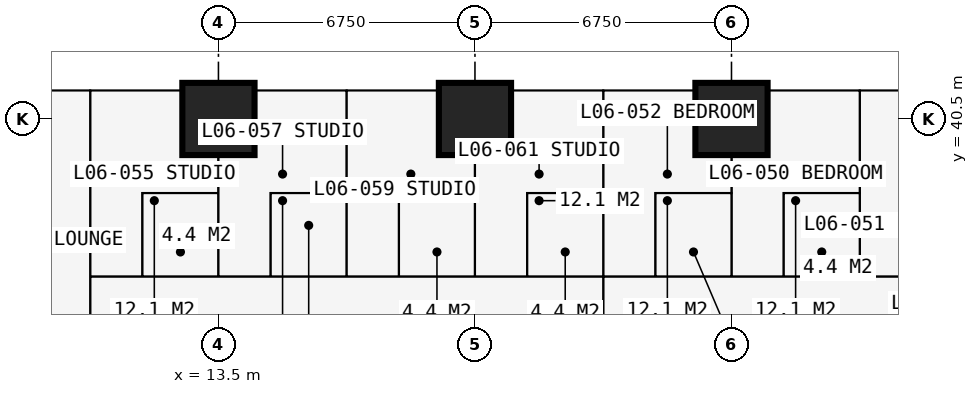
"""IFC4 building model, lengths in metres.
Left out: names, types, materials, properties, quantities, classifications, styles, units other than length and angle.
Written with IfcOpenShell. Run it as: python <this file> out.ifc"""

import sys

from ifc_helpers import new_model, si_unit, direction, frame, frame_2d, origin, origin_2d, place, context, subcontext, project, spatial, rectangle, extrude, element, fill, save


model = new_model("IFC4")
c1 = context("Model", 3, precision=1e-05, world=origin(), true_north=direction((0.0, 1.0)))
c2 = subcontext(c1, "Body", "Model", "MODEL_VIEW")
j1 = project(units=[si_unit("LENGTHUNIT", "METRE"), si_unit("PLANEANGLEUNIT", "RADIAN")], contexts=[c1])
p1 = place(None, origin())
s1 = spatial("IfcSite", under=j1, at=p1, CompositionType="ELEMENT")
p2 = place(p1, origin())
s2 = spatial("IfcBuilding", under=s1, at=p2, CompositionType="ELEMENT")
p3 = place(p2, frame((0.0, 0.0, 25.2)))
s3 = spatial("IfcBuildingStorey", under=s2, at=p3, CompositionType="ELEMENT", Elevation=25.2)
for number, where, z_axis, x_axis in (
    (1, (13.5, 40.5, 0.0), (0.0, 0.0, 1.0), (1.0, 0.0, 0.0)),
    (2, (20.25, 40.5, 0.0), (0.0, 0.0, 1.0), (1.0, 0.0, 0.0)),
    (3, (27.0, 40.5, 0.0), (0.0, 0.0, 1.0), (1.0, 0.0, 0.0)),
):
    element("IfcColumn", number, at=place(p3, frame(where, z_axis=z_axis, x_axis=x_axis)), inside=s3, PredefinedType="COLUMN", context=c2, shape_type="SweptSolid", body=[
        extrude(rectangle(XDim=1.9, YDim=1.9, at=origin_2d()), origin(), (0.0, 0.0, 1.0), 3.6),
    ])
p4 = place(p3, frame((13.5, 41.25, 0.0), z_axis=(0.0, 0.0, 1.0), x_axis=(1.0, 0.0, 0.0)))
e4 = element("IfcWall", 4, at=p4, inside=s3, PredefinedType="SOLIDWALL", context=c2, shape_type="SweptSolid", body=[
    extrude(rectangle(XDim=6.75, YDim=0.15, at=frame_2d((3.375, 0.0))), origin(), (0.0, 0.0, 1.0), 3.375),
])
p5 = place(p4, frame((0.996, 0.0, 0.0)))
e5 = element("IfcOpeningElement", 5, at=p5, cuts=e4, PredefinedType="OPENING", context=c2, shape_type="SweptSolid", body=[
    extrude(rectangle(XDim=1.0, YDim=2.2, at=frame_2d((0.5, 1.1))), frame((0.0, 0.085, 0.0), z_axis=(0.0, -1.0, 0.0), x_axis=(1.0, 0.0, 0.0)), (0.0, 0.0, 1.0), 0.17),
])
p6 = place(p4, frame((2.042, 0.0, 0.9)))
e6 = element("IfcOpeningElement", 6, at=p6, cuts=e4, PredefinedType="OPENING", context=c2, shape_type="SweptSolid", body=[
    extrude(rectangle(XDim=1.2, YDim=1.8, at=frame_2d((0.6, 0.9))), frame((0.0, 0.085, 0.0), z_axis=(0.0, -1.0, 0.0), x_axis=(1.0, 0.0, 0.0)), (0.0, 0.0, 1.0), 0.17),
])
p7 = place(p4, frame((4.754, 0.0, 0.0)))
e7 = element("IfcOpeningElement", 7, at=p7, cuts=e4, PredefinedType="OPENING", context=c2, shape_type="SweptSolid", body=[
    extrude(rectangle(XDim=1.0, YDim=2.2, at=frame_2d((0.5, 1.1))), frame((0.0, 0.085, 0.0), z_axis=(0.0, -1.0, 0.0), x_axis=(1.0, 0.0, 0.0)), (0.0, 0.0, 1.0), 0.17),
])
p8 = place(p4, frame((3.508, 0.0, 0.9)))
e8 = element("IfcOpeningElement", 8, at=p8, cuts=e4, PredefinedType="OPENING", context=c2, shape_type="SweptSolid", body=[
    extrude(rectangle(XDim=1.2, YDim=1.8, at=frame_2d((0.6, 0.9))), frame((0.0, 0.085, 0.0), z_axis=(0.0, -1.0, 0.0), x_axis=(1.0, 0.0, 0.0)), (0.0, 0.0, 1.0), 0.17),
])
p9 = place(p3, frame((16.875, 41.35, 0.0), z_axis=(0.0, 0.0, 1.0), x_axis=(0.0, 1.0, 0.0)))
e9 = element("IfcWall", 9, at=p9, inside=s3, PredefinedType="USERDEFINED", context=c2, shape_type="SweptSolid", body=[
    extrude(rectangle(XDim=2.2, YDim=1.0, at=frame_2d((1.1, 0.0))), origin(), (0.0, 0.0, 1.0), 0.9),
])
p10 = place(p3, frame((10.125, 30.375, 0.0), z_axis=(0.0, 0.0, 1.0), x_axis=(0.0, 1.0, 0.0)))
e10 = element("IfcWall", 10, at=p10, inside=s3, PredefinedType="PARTITIONING", context=c2, shape_type="SweptSolid", body=[
    extrude(rectangle(XDim=10.859, YDim=0.15, at=frame_2d((5.429, 0.0))), origin(), (0.0, 0.0, 1.0), 3.375),
])
p11 = place(p10, frame((4.725, 0.0, 0.0)))
e11 = element("IfcOpeningElement", 11, at=p11, cuts=e10, PredefinedType="OPENING", context=c2, shape_type="SweptSolid", body=[
    extrude(rectangle(XDim=1.0, YDim=2.2, at=frame_2d((0.5, 1.1))), frame((0.0, 0.085, 0.0), z_axis=(0.0, -1.0, 0.0), x_axis=(1.0, 0.0, 0.0)), (0.0, 0.0, 1.0), 0.17),
])
p12 = place(p3, frame((10.125, 36.35, 0.0), z_axis=(0.0, 0.0, 1.0), x_axis=(1.0, 0.0, 0.0)))
e12 = element("IfcWall", 12, at=p12, inside=s3, PredefinedType="PARTITIONING", context=c2, shape_type="SweptSolid", body=[
    extrude(rectangle(XDim=23.625, YDim=0.1, at=frame_2d((11.812, 0.0))), origin(), (0.0, 0.0, 1.0), 3.375),
])
p13 = place(p12, frame((21.45, 0.0, 0.0)))
e13 = element("IfcOpeningElement", 13, at=p13, cuts=e12, PredefinedType="OPENING", context=c2, shape_type="SweptSolid", body=[
    extrude(rectangle(XDim=1.0, YDim=2.2, at=frame_2d((0.5, 1.1))), frame((0.0, 0.06, 0.0), z_axis=(0.0, -1.0, 0.0), x_axis=(1.0, 0.0, 0.0)), (0.0, 0.0, 1.0), 0.12),
])
p14 = place(p12, frame((17.125, 0.0, 0.0)))
e14 = element("IfcOpeningElement", 14, at=p14, cuts=e12, PredefinedType="OPENING", context=c2, shape_type="SweptSolid", body=[
    extrude(rectangle(XDim=0.95, YDim=2.2, at=frame_2d((0.475, 1.1))), frame((0.0, 0.06, 0.0), z_axis=(0.0, -1.0, 0.0), x_axis=(1.0, 0.0, 0.0)), (0.0, 0.0, 1.0), 0.12),
])
p15 = place(p12, frame((13.7, 0.0, 0.0)))
e15 = element("IfcOpeningElement", 15, at=p15, cuts=e12, PredefinedType="OPENING", context=c2, shape_type="SweptSolid", body=[
    extrude(rectangle(XDim=0.95, YDim=2.2, at=frame_2d((0.475, 1.1))), frame((0.0, 0.06, 0.0), z_axis=(0.0, -1.0, 0.0), x_axis=(1.0, 0.0, 0.0)), (0.0, 0.0, 1.0), 0.12),
])
p16 = place(p12, frame((0.2, 0.0, 0.0)))
e16 = element("IfcOpeningElement", 16, at=p16, cuts=e12, PredefinedType="OPENING", context=c2, shape_type="SweptSolid", body=[
    extrude(rectangle(XDim=0.95, YDim=2.2, at=frame_2d((0.475, 1.1))), frame((0.0, 0.06, 0.0), z_axis=(0.0, -1.0, 0.0), x_axis=(1.0, 0.0, 0.0)), (0.0, 0.0, 1.0), 0.12),
])
p17 = place(p12, frame((3.625, 0.0, 0.0)))
e17 = element("IfcOpeningElement", 17, at=p17, cuts=e12, PredefinedType="OPENING", context=c2, shape_type="SweptSolid", body=[
    extrude(rectangle(XDim=0.95, YDim=2.2, at=frame_2d((0.475, 1.1))), frame((0.0, 0.06, 0.0), z_axis=(0.0, -1.0, 0.0), x_axis=(1.0, 0.0, 0.0)), (0.0, 0.0, 1.0), 0.12),
])
p18 = place(p12, frame((7.0, 0.0, 0.0)))
e18 = element("IfcOpeningElement", 18, at=p18, cuts=e12, PredefinedType="OPENING", context=c2, shape_type="SweptSolid", body=[
    extrude(rectangle(XDim=0.95, YDim=2.2, at=frame_2d((0.475, 1.1))), frame((0.0, 0.06, 0.0), z_axis=(0.0, -1.0, 0.0), x_axis=(1.0, 0.0, 0.0)), (0.0, 0.0, 1.0), 0.12),
])
p19 = place(p12, frame((10.375, 0.0, 0.0)))
e19 = element("IfcOpeningElement", 19, at=p19, cuts=e12, PredefinedType="OPENING", context=c2, shape_type="SweptSolid", body=[
    extrude(rectangle(XDim=0.95, YDim=2.2, at=frame_2d((0.475, 1.1))), frame((0.0, 0.06, 0.0), z_axis=(0.0, -1.0, 0.0), x_axis=(1.0, 0.0, 0.0)), (0.0, 0.0, 1.0), 0.12),
])
p20 = place(p3, frame((11.5, 36.35, 0.0), z_axis=(0.0, 0.0, 1.0), x_axis=(0.0, 1.0, 0.0)))
e20 = element("IfcWall", 20, at=p20, inside=s3, PredefinedType="PARTITIONING", context=c2, shape_type="SweptSolid", body=[
    extrude(rectangle(XDim=2.2, YDim=0.1, at=frame_2d((1.1, 0.0))), origin(), (0.0, 0.0, 1.0), 3.375),
])
p21 = place(p20, frame((0.65, 0.0, 0.0)))
e21 = element("IfcOpeningElement", 21, at=p21, cuts=e20, PredefinedType="OPENING", context=c2, shape_type="SweptSolid", body=[
    extrude(rectangle(XDim=0.9, YDim=2.2, at=frame_2d((0.45, 1.1))), frame((0.0, 0.06, 0.0), z_axis=(0.0, -1.0, 0.0), x_axis=(1.0, 0.0, 0.0)), (0.0, 0.0, 1.0), 0.12),
])
p22 = place(p3, frame((11.5, 38.55, 0.0), z_axis=(0.0, 0.0, 1.0), x_axis=(1.0, 0.0, 0.0)))
e22 = element("IfcWall", 22, at=p22, inside=s3, PredefinedType="PARTITIONING", context=c2, shape_type="SweptSolid", body=[
    extrude(rectangle(XDim=2.0, YDim=0.1, at=frame_2d((1.0, 0.0))), origin(), (0.0, 0.0, 1.0), 3.375),
])
p23 = place(p3, frame((13.5, 36.35, 0.0), z_axis=(0.0, 0.0, 1.0), x_axis=(0.0, 1.0, 0.0)))
e23 = element("IfcWall", 23, at=p23, inside=s3, PredefinedType="PARTITIONING", context=c2, shape_type="SweptSolid", body=[
    extrude(rectangle(XDim=4.884, YDim=0.175, at=frame_2d((2.442, 0.0))), origin(), (0.0, 0.0, 1.0), 2.877),
])
p24 = place(p3, frame((14.875, 36.35, 0.0), z_axis=(0.0, 0.0, 1.0), x_axis=(0.0, 1.0, 0.0)))
e24 = element("IfcWall", 24, at=p24, inside=s3, PredefinedType="PARTITIONING", context=c2, shape_type="SweptSolid", body=[
    extrude(rectangle(XDim=2.2, YDim=0.1, at=frame_2d((1.1, 0.0))), origin(), (0.0, 0.0, 1.0), 3.375),
])
p25 = place(p24, frame((0.65, 0.0, 0.0)))
e25 = element("IfcOpeningElement", 25, at=p25, cuts=e24, PredefinedType="OPENING", context=c2, shape_type="SweptSolid", body=[
    extrude(rectangle(XDim=0.9, YDim=2.2, at=frame_2d((0.45, 1.1))), frame((0.0, 0.06, 0.0), z_axis=(0.0, -1.0, 0.0), x_axis=(1.0, 0.0, 0.0)), (0.0, 0.0, 1.0), 0.12),
])
p26 = place(p3, frame((14.875, 38.55, 0.0), z_axis=(0.0, 0.0, 1.0), x_axis=(1.0, 0.0, 0.0)))
e26 = element("IfcWall", 26, at=p26, inside=s3, PredefinedType="PARTITIONING", context=c2, shape_type="SweptSolid", body=[
    extrude(rectangle(XDim=2.0, YDim=0.1, at=frame_2d((1.0, 0.0))), origin(), (0.0, 0.0, 1.0), 3.375),
])
p27 = place(p3, frame((16.875, 36.35, 0.0), z_axis=(0.0, 0.0, 1.0), x_axis=(0.0, 1.0, 0.0)))
e27 = element("IfcWall", 27, at=p27, inside=s3, PredefinedType="PARTITIONING", context=c2, shape_type="SweptSolid", body=[
    extrude(rectangle(XDim=4.884, YDim=0.175, at=frame_2d((2.442, 0.0))), origin(), (0.0, 0.0, 1.0), 3.375),
])
p28 = place(p3, frame((18.25, 36.35, 0.0), z_axis=(0.0, 0.0, 1.0), x_axis=(0.0, 1.0, 0.0)))
e28 = element("IfcWall", 28, at=p28, inside=s3, PredefinedType="PARTITIONING", context=c2, shape_type="SweptSolid", body=[
    extrude(rectangle(XDim=2.2, YDim=0.1, at=frame_2d((1.1, 0.0))), origin(), (0.0, 0.0, 1.0), 3.375),
])
p29 = place(p28, frame((0.65, 0.0, 0.0)))
e29 = element("IfcOpeningElement", 29, at=p29, cuts=e28, PredefinedType="OPENING", context=c2, shape_type="SweptSolid", body=[
    extrude(rectangle(XDim=0.9, YDim=2.2, at=frame_2d((0.45, 1.1))), frame((0.0, 0.06, 0.0), z_axis=(0.0, -1.0, 0.0), x_axis=(1.0, 0.0, 0.0)), (0.0, 0.0, 1.0), 0.12),
])
p30 = place(p3, frame((18.25, 38.55, 0.0), z_axis=(0.0, 0.0, 1.0), x_axis=(1.0, 0.0, 0.0)))
e30 = element("IfcWall", 30, at=p30, inside=s3, PredefinedType="PARTITIONING", context=c2, shape_type="SweptSolid", body=[
    extrude(rectangle(XDim=2.0, YDim=0.1, at=frame_2d((1.0, 0.0))), origin(), (0.0, 0.0, 1.0), 3.375),
])
p31 = place(p3, frame((20.25, 36.35, 0.0), z_axis=(0.0, 0.0, 1.0), x_axis=(0.0, 1.0, 0.0)))
e31 = element("IfcWall", 31, at=p31, inside=s3, PredefinedType="PARTITIONING", context=c2, shape_type="SweptSolid", body=[
    extrude(rectangle(XDim=4.884, YDim=0.175, at=frame_2d((2.442, 0.0))), origin(), (0.0, 0.0, 1.0), 2.61),
])
p32 = place(p3, frame((21.625, 36.35, 0.0), z_axis=(0.0, 0.0, 1.0), x_axis=(0.0, 1.0, 0.0)))
e32 = element("IfcWall", 32, at=p32, inside=s3, PredefinedType="PARTITIONING", context=c2, shape_type="SweptSolid", body=[
    extrude(rectangle(XDim=2.2, YDim=0.1, at=frame_2d((1.1, 0.0))), origin(), (0.0, 0.0, 1.0), 3.375),
])
p33 = place(p32, frame((0.65, 0.0, 0.0)))
e33 = element("IfcOpeningElement", 33, at=p33, cuts=e32, PredefinedType="OPENING", context=c2, shape_type="SweptSolid", body=[
    extrude(rectangle(XDim=0.9, YDim=2.2, at=frame_2d((0.45, 1.1))), frame((0.0, 0.06, 0.0), z_axis=(0.0, -1.0, 0.0), x_axis=(1.0, 0.0, 0.0)), (0.0, 0.0, 1.0), 0.12),
])
p34 = place(p3, frame((21.625, 38.55, 0.0), z_axis=(0.0, 0.0, 1.0), x_axis=(1.0, 0.0, 0.0)))
e34 = element("IfcWall", 34, at=p34, inside=s3, PredefinedType="PARTITIONING", context=c2, shape_type="SweptSolid", body=[
    extrude(rectangle(XDim=2.0, YDim=0.1, at=frame_2d((1.0, 0.0))), origin(), (0.0, 0.0, 1.0), 3.375),
])
p35 = place(p3, frame((23.625, 29.2, 0.0), z_axis=(0.0, 0.0, 1.0), x_axis=(0.0, 1.0, 0.0)))
e35 = element("IfcWall", 35, at=p35, inside=s3, PredefinedType="PARTITIONING", context=c2, shape_type="SweptSolid", body=[
    extrude(rectangle(XDim=12.034, YDim=0.15, at=frame_2d((6.017, 0.0))), origin(), (0.0, 0.0, 1.0), 3.375),
])
p36 = place(p3, frame((25.0, 36.35, 0.0), z_axis=(0.0, 0.0, 1.0), x_axis=(0.0, 1.0, 0.0)))
e36 = element("IfcWall", 36, at=p36, inside=s3, PredefinedType="PARTITIONING", context=c2, shape_type="SweptSolid", body=[
    extrude(rectangle(XDim=2.2, YDim=0.1, at=frame_2d((1.1, 0.0))), origin(), (0.0, 0.0, 1.0), 3.375),
])
p37 = place(p3, frame((25.0, 38.55, 0.0), z_axis=(0.0, 0.0, 1.0), x_axis=(1.0, 0.0, 0.0)))
e37 = element("IfcWall", 37, at=p37, inside=s3, PredefinedType="PARTITIONING", context=c2, shape_type="SweptSolid", body=[
    extrude(rectangle(XDim=2.0, YDim=0.1, at=frame_2d((1.0, 0.0))), origin(), (0.0, 0.0, 1.0), 3.375),
])
p38 = place(p3, frame((27.0, 36.35, 0.0), z_axis=(0.0, 0.0, 1.0), x_axis=(0.0, 1.0, 0.0)))
e38 = element("IfcWall", 38, at=p38, inside=s3, PredefinedType="PARTITIONING", context=c2, shape_type="SweptSolid", body=[
    extrude(rectangle(XDim=4.884, YDim=0.175, at=frame_2d((2.442, 0.0))), origin(), (0.0, 0.0, 1.0), 2.61),
])
p39 = place(p38, frame((0.65, 0.0, 0.0)))
e39 = element("IfcOpeningElement", 39, at=p39, cuts=e38, PredefinedType="OPENING", context=c2, shape_type="SweptSolid", body=[
    extrude(rectangle(XDim=0.9, YDim=2.2, at=frame_2d((0.45, 1.1))), frame((0.0, 0.097, 0.0), z_axis=(0.0, -1.0, 0.0), x_axis=(1.0, 0.0, 0.0)), (0.0, 0.0, 1.0), 0.195),
])
p40 = place(p3, frame((28.375, 36.35, 0.0), z_axis=(0.0, 0.0, 1.0), x_axis=(0.0, 1.0, 0.0)))
e40 = element("IfcWall", 40, at=p40, inside=s3, PredefinedType="PARTITIONING", context=c2, shape_type="SweptSolid", body=[
    extrude(rectangle(XDim=2.2, YDim=0.1, at=frame_2d((1.1, 0.0))), origin(), (0.0, 0.0, 1.0), 3.375),
])
p41 = place(p40, frame((0.65, 0.0, 0.0)))
e41 = element("IfcOpeningElement", 41, at=p41, cuts=e40, PredefinedType="OPENING", context=c2, shape_type="SweptSolid", body=[
    extrude(rectangle(XDim=0.9, YDim=2.2, at=frame_2d((0.45, 1.1))), frame((0.0, 0.06, 0.0), z_axis=(0.0, -1.0, 0.0), x_axis=(1.0, 0.0, 0.0)), (0.0, 0.0, 1.0), 0.12),
])
p42 = place(p3, frame((28.375, 38.55, 0.0), z_axis=(0.0, 0.0, 1.0), x_axis=(1.0, 0.0, 0.0)))
e42 = element("IfcWall", 42, at=p42, inside=s3, PredefinedType="PARTITIONING", context=c2, shape_type="SweptSolid", body=[
    extrude(rectangle(XDim=2.0, YDim=0.1, at=frame_2d((1.0, 0.0))), origin(), (0.0, 0.0, 1.0), 3.375),
])
p43 = place(p3, frame((30.375, 36.35, 0.0), z_axis=(0.0, 0.0, 1.0), x_axis=(0.0, 1.0, 0.0)))
e43 = element("IfcWall", 43, at=p43, inside=s3, PredefinedType="PARTITIONING", context=c2, shape_type="SweptSolid", body=[
    extrude(rectangle(XDim=4.884, YDim=0.15, at=frame_2d((2.442, 0.0))), origin(), (0.0, 0.0, 1.0), 3.375),
])
p44 = place(p5, origin())
e44 = element("IfcDoor", 44, at=p44, inside=s3, OperationType="SINGLE_SWING_LEFT", PredefinedType="DOOR", context=c2, shape_type="SweptSolid", body=[
    extrude(rectangle(XDim=1.0, YDim=2.2, at=frame_2d((0.5, 1.1))), frame((0.0, 0.025, 0.0), z_axis=(0.0, -1.0, 0.0), x_axis=(1.0, 0.0, 0.0)), (0.0, 0.0, 1.0), 0.05),
])
fill(e5, e44)
p45 = place(p6, origin())
e45 = element("IfcWindow", 45, at=p45, inside=s3, PartitioningType="SINGLE_PANEL", PredefinedType="WINDOW", context=c2, shape_type="SweptSolid", body=[
    extrude(rectangle(XDim=1.2, YDim=1.8, at=frame_2d((0.6, 0.9))), frame((0.0, 0.03, 0.0), z_axis=(0.0, -1.0, 0.0), x_axis=(1.0, 0.0, 0.0)), (0.0, 0.0, 1.0), 0.06),
])
fill(e6, e45)
p46 = place(p7, origin())
e46 = element("IfcDoor", 46, at=p46, inside=s3, OperationType="SINGLE_SWING_RIGHT", PredefinedType="DOOR", context=c2, shape_type="SweptSolid", body=[
    extrude(rectangle(XDim=1.0, YDim=2.2, at=frame_2d((0.5, 1.1))), frame((0.0, 0.025, 0.0), z_axis=(0.0, -1.0, 0.0), x_axis=(1.0, 0.0, 0.0)), (0.0, 0.0, 1.0), 0.05),
])
fill(e7, e46)
p47 = place(p8, origin())
e47 = element("IfcWindow", 47, at=p47, inside=s3, PartitioningType="SINGLE_PANEL", PredefinedType="WINDOW", context=c2, shape_type="SweptSolid", body=[
    extrude(rectangle(XDim=1.2, YDim=1.8, at=frame_2d((0.6, 0.9))), frame((0.0, 0.03, 0.0), z_axis=(0.0, -1.0, 0.0), x_axis=(1.0, 0.0, 0.0)), (0.0, 0.0, 1.0), 0.06),
])
fill(e8, e47)
p48 = place(p14, origin())
e48 = element("IfcDoor", 48, at=p48, inside=s3, OperationType="SINGLE_SWING_LEFT", PredefinedType="DOOR", context=c2, shape_type="SweptSolid", body=[
    extrude(rectangle(XDim=0.95, YDim=2.2, at=frame_2d((0.475, 1.1))), frame((0.0, 0.025, 0.0), z_axis=(0.0, -1.0, 0.0), x_axis=(1.0, 0.0, 0.0)), (0.0, 0.0, 1.0), 0.05),
])
fill(e14, e48)
p49 = place(p41, origin())
e49 = element("IfcDoor", 49, at=p49, inside=s3, OperationType="SINGLE_SWING_RIGHT", PredefinedType="DOOR", context=c2, shape_type="SweptSolid", body=[
    extrude(rectangle(XDim=0.9, YDim=2.2, at=frame_2d((0.45, 1.1))), frame((0.0, 0.025, 0.0), z_axis=(0.0, -1.0, 0.0), x_axis=(1.0, 0.0, 0.0)), (0.0, 0.0, 1.0), 0.05),
])
fill(e41, e49)
p50 = place(p15, origin())
e50 = element("IfcDoor", 50, at=p50, inside=s3, OperationType="SINGLE_SWING_LEFT", PredefinedType="DOOR", context=c2, shape_type="SweptSolid", body=[
    extrude(rectangle(XDim=0.95, YDim=2.2, at=frame_2d((0.475, 1.1))), frame((0.0, 0.025, 0.0), z_axis=(0.0, -1.0, 0.0), x_axis=(1.0, 0.0, 0.0)), (0.0, 0.0, 1.0), 0.05),
])
fill(e15, e50)
p51 = place(p39, origin())
e51 = element("IfcDoor", 51, at=p51, inside=s3, OperationType="SINGLE_SWING_RIGHT", PredefinedType="DOOR", context=c2, shape_type="SweptSolid", body=[
    extrude(rectangle(XDim=0.9, YDim=2.2, at=frame_2d((0.45, 1.1))), frame((0.0, 0.025, 0.0), z_axis=(0.0, -1.0, 0.0), x_axis=(1.0, 0.0, 0.0)), (0.0, 0.0, 1.0), 0.05),
])
fill(e39, e51)
p52 = place(p16, origin())
e52 = element("IfcDoor", 52, at=p52, inside=s3, OperationType="SINGLE_SWING_LEFT", PredefinedType="DOOR", context=c2, shape_type="SweptSolid", body=[
    extrude(rectangle(XDim=0.95, YDim=2.2, at=frame_2d((0.475, 1.1))), frame((0.0, 0.025, 0.0), z_axis=(0.0, -1.0, 0.0), x_axis=(1.0, 0.0, 0.0)), (0.0, 0.0, 1.0), 0.05),
])
fill(e16, e52)
p53 = place(p21, origin())
e53 = element("IfcDoor", 53, at=p53, inside=s3, OperationType="SINGLE_SWING_RIGHT", PredefinedType="DOOR", context=c2, shape_type="SweptSolid", body=[
    extrude(rectangle(XDim=0.9, YDim=2.2, at=frame_2d((0.45, 1.1))), frame((0.0, 0.025, 0.0), z_axis=(0.0, -1.0, 0.0), x_axis=(1.0, 0.0, 0.0)), (0.0, 0.0, 1.0), 0.05),
])
fill(e21, e53)
p54 = place(p17, origin())
e54 = element("IfcDoor", 54, at=p54, inside=s3, OperationType="SINGLE_SWING_LEFT", PredefinedType="DOOR", context=c2, shape_type="SweptSolid", body=[
    extrude(rectangle(XDim=0.95, YDim=2.2, at=frame_2d((0.475, 1.1))), frame((0.0, 0.025, 0.0), z_axis=(0.0, -1.0, 0.0), x_axis=(1.0, 0.0, 0.0)), (0.0, 0.0, 1.0), 0.05),
])
fill(e17, e54)
p55 = place(p25, origin())
e55 = element("IfcDoor", 55, at=p55, inside=s3, OperationType="SINGLE_SWING_RIGHT", PredefinedType="DOOR", context=c2, shape_type="SweptSolid", body=[
    extrude(rectangle(XDim=0.9, YDim=2.2, at=frame_2d((0.45, 1.1))), frame((0.0, 0.025, 0.0), z_axis=(0.0, -1.0, 0.0), x_axis=(1.0, 0.0, 0.0)), (0.0, 0.0, 1.0), 0.05),
])
fill(e25, e55)
p56 = place(p18, origin())
e56 = element("IfcDoor", 56, at=p56, inside=s3, OperationType="SINGLE_SWING_LEFT", PredefinedType="DOOR", context=c2, shape_type="SweptSolid", body=[
    extrude(rectangle(XDim=0.95, YDim=2.2, at=frame_2d((0.475, 1.1))), frame((0.0, 0.025, 0.0), z_axis=(0.0, -1.0, 0.0), x_axis=(1.0, 0.0, 0.0)), (0.0, 0.0, 1.0), 0.05),
])
fill(e18, e56)
p57 = place(p29, origin())
e57 = element("IfcDoor", 57, at=p57, inside=s3, OperationType="SINGLE_SWING_RIGHT", PredefinedType="DOOR", context=c2, shape_type="SweptSolid", body=[
    extrude(rectangle(XDim=0.9, YDim=2.2, at=frame_2d((0.45, 1.1))), frame((0.0, 0.025, 0.0), z_axis=(0.0, -1.0, 0.0), x_axis=(1.0, 0.0, 0.0)), (0.0, 0.0, 1.0), 0.05),
])
fill(e29, e57)
p58 = place(p19, origin())
e58 = element("IfcDoor", 58, at=p58, inside=s3, OperationType="SINGLE_SWING_LEFT", PredefinedType="DOOR", context=c2, shape_type="SweptSolid", body=[
    extrude(rectangle(XDim=0.95, YDim=2.2, at=frame_2d((0.475, 1.1))), frame((0.0, 0.025, 0.0), z_axis=(0.0, -1.0, 0.0), x_axis=(1.0, 0.0, 0.0)), (0.0, 0.0, 1.0), 0.05),
])
fill(e19, e58)
p59 = place(p33, origin())
e59 = element("IfcDoor", 59, at=p59, inside=s3, OperationType="SINGLE_SWING_RIGHT", PredefinedType="DOOR", context=c2, shape_type="SweptSolid", body=[
    extrude(rectangle(XDim=0.9, YDim=2.2, at=frame_2d((0.45, 1.1))), frame((0.0, 0.025, 0.0), z_axis=(0.0, -1.0, 0.0), x_axis=(1.0, 0.0, 0.0)), (0.0, 0.0, 1.0), 0.05),
])
fill(e33, e59)
p60 = place(p11, origin())
e60 = element("IfcDoor", 60, at=p60, inside=s3, OperationType="SINGLE_SWING_LEFT", PredefinedType="DOOR", context=c2, shape_type="SweptSolid", body=[
    extrude(rectangle(XDim=1.0, YDim=2.2, at=frame_2d((0.5, 1.1))), frame((0.0, 0.025, 0.0), z_axis=(0.0, -1.0, 0.0), x_axis=(1.0, 0.0, 0.0)), (0.0, 0.0, 1.0), 0.05),
])
fill(e11, e60)
save(model, sys.argv[1])
